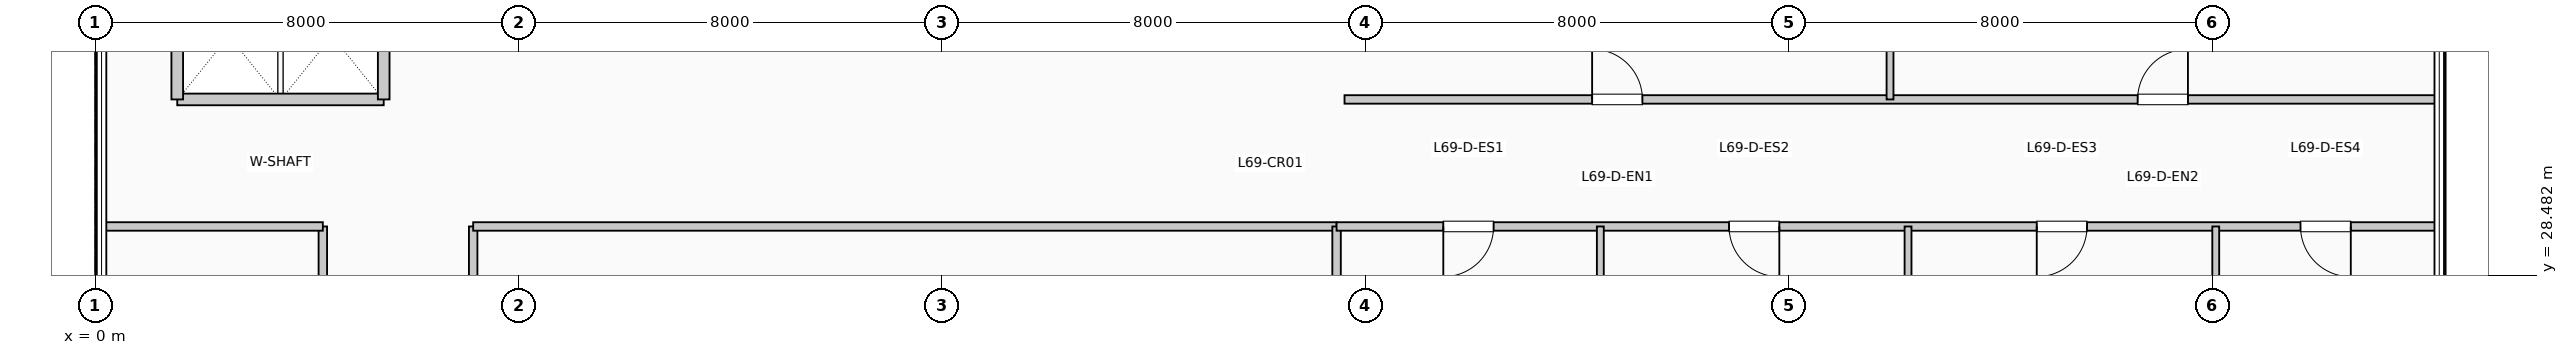
"""IFC4 building model, lengths in metres.
Left out: names, types, materials, properties, quantities, classifications, styles, units other than length and angle.
Written with IfcOpenShell. Run it as: python <this file> out.ifc"""

import sys

from ifc_helpers import new_model, si_unit, direction, frame, frame_2d, origin, place, context, subcontext, project, spatial, rectangle, extrude, element, fill, save


model = new_model("IFC4")
c1 = context("Model", 3, precision=1e-05, world=origin(), true_north=direction((0.0, 1.0)))
c2 = subcontext(c1, "Body", "Model", "MODEL_VIEW")
j1 = project(units=[si_unit("LENGTHUNIT", "METRE"), si_unit("PLANEANGLEUNIT", "RADIAN")], contexts=[c1])
p1 = place(None, origin())
s1 = spatial("IfcSite", under=j1, at=p1, CompositionType="ELEMENT")
p2 = place(p1, origin())
s2 = spatial("IfcBuilding", under=s1, at=p2, CompositionType="ELEMENT")
p3 = place(p2, frame((0.0, 0.0, 284.13)))
s3 = spatial("IfcBuildingStorey", under=s2, at=p3, CompositionType="ELEMENT", Elevation=284.13)
p4 = place(p3, frame((1.55, 31.8, 0.0), z_axis=(0.0, 0.0, 1.0), x_axis=(1.0, 0.0, 0.0)))
e1 = element("IfcWall", 1, at=p4, inside=s3, PredefinedType="PARTITIONING", context=c2, shape_type="SweptSolid", body=[
    extrude(rectangle(XDim=3.9, YDim=0.22, at=frame_2d((1.95, 0.0))), origin(), (0.0, 0.0, 1.0), 3.74),
])
for number, where, z_axis, x_axis in (
    (2, (1.55, 31.8, 0.0), (0.0, 0.0, 1.0), (0.0, 1.0, 0.0)),
    (3, (5.45, 31.8, 0.0), (0.0, 0.0, 1.0), (0.0, 1.0, 0.0)),
):
    element("IfcWall", number, at=place(p3, frame(where, z_axis=z_axis, x_axis=x_axis)), inside=s3, PredefinedType="PARTITIONING", context=c2, shape_type="SweptSolid", body=[
        extrude(rectangle(XDim=2.38, YDim=0.22, at=frame_2d((1.19, 0.0))), origin(), (0.0, 0.0, 1.0), 3.74),
    ])
p5 = place(p3, frame((4.3, 12.8, 0.0), z_axis=(0.0, 0.0, 1.0), x_axis=(0.0, 1.0, 0.0)))
e4 = element("IfcWall", 4, at=p5, inside=s3, PredefinedType="PARTITIONING", context=c2, shape_type="SweptSolid", body=[
    extrude(rectangle(XDim=16.6, YDim=0.16, at=frame_2d((8.3, 0.0))), origin(), (0.0, 0.0, 1.0), 3.74),
])
p6 = place(p5, frame((8.775, 0.0, 0.0), z_axis=(0.0, 0.0, 1.0), x_axis=(-1.0, 0.0, 0.0)))
e5 = element("IfcOpeningElement", 5, at=p6, cuts=e4, PredefinedType="OPENING", context=c2, shape_type="SweptSolid", body=[
    extrude(rectangle(XDim=0.95, YDim=2.15, at=frame_2d((0.475, 1.075))), frame((0.0, 0.09, 0.0), z_axis=(0.0, -1.0, 0.0), x_axis=(1.0, 0.0, 0.0)), (0.0, 0.0, 1.0), 0.18),
])
p7 = place(p3, frame((7.14, 12.8, 0.0), z_axis=(0.0, 0.0, 1.0), x_axis=(0.0, 1.0, 0.0)))
e6 = element("IfcWall", 6, at=p7, inside=s3, PredefinedType="PARTITIONING", context=c2, shape_type="SweptSolid", body=[
    extrude(rectangle(XDim=16.6, YDim=0.16, at=frame_2d((8.3, 0.0))), origin(), (0.0, 0.0, 1.0), 3.74),
])
p8 = place(p7, frame((1.849, 0.0, 0.0)))
e7 = element("IfcOpeningElement", 7, at=p8, cuts=e6, PredefinedType="OPENING", context=c2, shape_type="SweptSolid", body=[
    extrude(rectangle(XDim=0.95, YDim=2.15, at=frame_2d((0.475, 1.075))), frame((0.0, 0.09, 0.0), z_axis=(0.0, -1.0, 0.0), x_axis=(1.0, 0.0, 0.0)), (0.0, 0.0, 1.0), 0.18),
])
p9 = place(p7, frame((6.829, 0.0, 0.0)))
e8 = element("IfcOpeningElement", 8, at=p9, cuts=e6, PredefinedType="OPENING", context=c2, shape_type="SweptSolid", body=[
    extrude(rectangle(XDim=0.95, YDim=2.15, at=frame_2d((0.475, 1.075))), frame((0.0, 0.09, 0.0), z_axis=(0.0, -1.0, 0.0), x_axis=(1.0, 0.0, 0.0)), (0.0, 0.0, 1.0), 0.18),
])
p10 = place(p7, frame((12.805, 0.0, 0.0)))
e9 = element("IfcOpeningElement", 9, at=p10, cuts=e6, PredefinedType="OPENING", context=c2, shape_type="SweptSolid", body=[
    extrude(rectangle(XDim=0.95, YDim=2.15, at=frame_2d((0.475, 1.075))), frame((0.0, 0.09, 0.0), z_axis=(0.0, -1.0, 0.0), x_axis=(1.0, 0.0, 0.0)), (0.0, 0.0, 1.0), 0.18),
])
p11 = place(p3, frame((0.19, 29.4, 0.0), z_axis=(0.0, 0.0, 1.0), x_axis=(1.0, 0.0, 0.0)))
e10 = element("IfcWall", 10, at=p11, inside=s3, PredefinedType="PARTITIONING", context=c2, shape_type="SweptSolid", body=[
    extrude(rectangle(XDim=4.11, YDim=0.16, at=frame_2d((2.055, 0.0))), origin(), (0.0, 0.0, 1.0), 3.425),
])
p12 = place(p3, frame((7.14, 29.4, 0.0), z_axis=(0.0, 0.0, 1.0), x_axis=(1.0, 0.0, 0.0)))
e11 = element("IfcWall", 11, at=p12, inside=s3, PredefinedType="PARTITIONING", context=c2, shape_type="SweptSolid", body=[
    extrude(rectangle(XDim=16.31, YDim=0.16, at=frame_2d((8.155, 0.0))), origin(), (0.0, 0.0, 1.0), 3.425),
])
p13 = place(p3, frame((23.45, 5.99, 0.0), z_axis=(0.0, 0.0, 1.0), x_axis=(0.0, 1.0, 0.0)))
e12 = element("IfcWall", 12, at=p13, inside=s3, PredefinedType="PARTITIONING", context=c2, shape_type="SweptSolid", body=[
    extrude(rectangle(XDim=23.41, YDim=0.16, at=frame_2d((11.705, 0.0))), origin(), (0.0, 0.0, 1.0), 3.175),
])
p14 = place(p3, frame((23.45, 29.4, 0.0), z_axis=(0.0, 0.0, 1.0), x_axis=(1.0, 0.0, 0.0)))
e13 = element("IfcWall", 13, at=p14, inside=s3, PredefinedType="PARTITIONING", context=c2, shape_type="SweptSolid", body=[
    extrude(rectangle(XDim=20.76, YDim=0.16, at=frame_2d((10.38, 0.0))), origin(), (0.0, 0.0, 1.0), 3.425),
])
p15 = place(p14, frame((2.966, 0.0, 0.0), z_axis=(0.0, 0.0, 1.0), x_axis=(-1.0, 0.0, 0.0)))
e14 = element("IfcOpeningElement", 14, at=p15, cuts=e13, PredefinedType="OPENING", context=c2, shape_type="SweptSolid", body=[
    extrude(rectangle(XDim=0.95, YDim=2.15, at=frame_2d((0.475, 1.075))), frame((0.0, 0.09, 0.0), z_axis=(0.0, -1.0, 0.0), x_axis=(1.0, 0.0, 0.0)), (0.0, 0.0, 1.0), 0.18),
])
p16 = place(p14, frame((8.364, 0.0, 0.0), z_axis=(0.0, 0.0, 1.0), x_axis=(-1.0, 0.0, 0.0)))
e15 = element("IfcOpeningElement", 15, at=p16, cuts=e13, PredefinedType="OPENING", context=c2, shape_type="SweptSolid", body=[
    extrude(rectangle(XDim=0.95, YDim=2.15, at=frame_2d((0.475, 1.075))), frame((0.0, 0.09, 0.0), z_axis=(0.0, -1.0, 0.0), x_axis=(1.0, 0.0, 0.0)), (0.0, 0.0, 1.0), 0.18),
])
p17 = place(p14, frame((14.177, 0.0, 0.0), z_axis=(0.0, 0.0, 1.0), x_axis=(-1.0, 0.0, 0.0)))
e16 = element("IfcOpeningElement", 16, at=p17, cuts=e13, PredefinedType="OPENING", context=c2, shape_type="SweptSolid", body=[
    extrude(rectangle(XDim=0.95, YDim=2.15, at=frame_2d((0.475, 1.075))), frame((0.0, 0.09, 0.0), z_axis=(0.0, -1.0, 0.0), x_axis=(1.0, 0.0, 0.0)), (0.0, 0.0, 1.0), 0.18),
])
p18 = place(p14, frame((19.159, 0.0, 0.0), z_axis=(0.0, 0.0, 1.0), x_axis=(-1.0, 0.0, 0.0)))
e17 = element("IfcOpeningElement", 17, at=p18, cuts=e13, PredefinedType="OPENING", context=c2, shape_type="SweptSolid", body=[
    extrude(rectangle(XDim=0.95, YDim=2.15, at=frame_2d((0.475, 1.075))), frame((0.0, 0.09, 0.0), z_axis=(0.0, -1.0, 0.0), x_axis=(1.0, 0.0, 0.0)), (0.0, 0.0, 1.0), 0.18),
])
p19 = place(p3, frame((23.6, 31.8, 0.0), z_axis=(0.0, 0.0, 1.0), x_axis=(1.0, 0.0, 0.0)))
e18 = element("IfcWall", 18, at=p19, inside=s3, PredefinedType="PARTITIONING", context=c2, shape_type="SweptSolid", body=[
    extrude(rectangle(XDim=20.61, YDim=0.16, at=frame_2d((10.305, 0.0))), origin(), (0.0, 0.0, 1.0), 3.74),
])
p20 = place(p19, frame((4.677, 0.0, 0.0)))
e19 = element("IfcOpeningElement", 19, at=p20, cuts=e18, PredefinedType="OPENING", context=c2, shape_type="SweptSolid", body=[
    extrude(rectangle(XDim=0.95, YDim=2.15, at=frame_2d((0.475, 1.075))), frame((0.0, 0.09, 0.0), z_axis=(0.0, -1.0, 0.0), x_axis=(1.0, 0.0, 0.0)), (0.0, 0.0, 1.0), 0.18),
])
p21 = place(p19, frame((14.982, 0.0, 0.0)))
e20 = element("IfcOpeningElement", 20, at=p21, cuts=e18, PredefinedType="OPENING", context=c2, shape_type="SweptSolid", body=[
    extrude(rectangle(XDim=0.95, YDim=2.15, at=frame_2d((0.475, 1.075))), frame((0.0, 0.09, 0.0), z_axis=(0.0, -1.0, 0.0), x_axis=(1.0, 0.0, 0.0)), (0.0, 0.0, 1.0), 0.18),
])
for number, where, z_axis, x_axis in (
    (21, (28.432, 25.19, 0.0), (0.0, 0.0, 1.0), (0.0, 1.0, 0.0)),
    (22, (34.245, 25.19, 0.0), (0.0, 0.0, 1.0), (0.0, 1.0, 0.0)),
):
    element("IfcWall", number, at=place(p3, frame(where, z_axis=z_axis, x_axis=x_axis)), inside=s3, PredefinedType="PARTITIONING", context=c2, shape_type="SweptSolid", body=[
        extrude(rectangle(XDim=4.21, YDim=0.13, at=frame_2d((2.105, 0.0))), origin(), (0.0, 0.0, 1.0), 3.74),
    ])
p22 = place(p3, frame((40.058, 25.19, 0.0), z_axis=(0.0, 0.0, 1.0), x_axis=(0.0, 1.0, 0.0)))
e23 = element("IfcWall", 23, at=p22, inside=s3, PredefinedType="PARTITIONING", context=c2, shape_type="SweptSolid", body=[
    extrude(rectangle(XDim=4.21, YDim=0.13, at=frame_2d((2.105, 0.0))), origin(), (0.0, 0.0, 1.0), 3.175),
])
p23 = place(p3, frame((33.905, 31.8, 0.0), z_axis=(0.0, 0.0, 1.0), x_axis=(0.0, 1.0, 0.0)))
e24 = element("IfcWall", 24, at=p23, inside=s3, PredefinedType="PARTITIONING", context=c2, shape_type="SweptSolid", body=[
    extrude(rectangle(XDim=14.01, YDim=0.13, at=frame_2d((7.005, 0.0))), origin(), (0.0, 0.0, 1.0), 3.74),
])
p24 = place(p15, origin())
e25 = element("IfcDoor", 25, at=p24, inside=s3, OperationType="SINGLE_SWING_LEFT", PredefinedType="DOOR", context=c2, shape_type="SweptSolid", body=[
    extrude(rectangle(XDim=0.95, YDim=2.15, at=frame_2d((0.475, 1.075))), frame((0.0, 0.025, 0.0), z_axis=(0.0, -1.0, 0.0), x_axis=(1.0, 0.0, 0.0)), (0.0, 0.0, 1.0), 0.05),
])
fill(e14, e25)
p25 = place(p16, origin())
e26 = element("IfcDoor", 26, at=p25, inside=s3, OperationType="SINGLE_SWING_RIGHT", PredefinedType="DOOR", context=c2, shape_type="SweptSolid", body=[
    extrude(rectangle(XDim=0.95, YDim=2.15, at=frame_2d((0.475, 1.075))), frame((0.0, 0.025, 0.0), z_axis=(0.0, -1.0, 0.0), x_axis=(1.0, 0.0, 0.0)), (0.0, 0.0, 1.0), 0.05),
])
fill(e15, e26)
p26 = place(p17, origin())
e27 = element("IfcDoor", 27, at=p26, inside=s3, OperationType="SINGLE_SWING_LEFT", PredefinedType="DOOR", context=c2, shape_type="SweptSolid", body=[
    extrude(rectangle(XDim=0.95, YDim=2.15, at=frame_2d((0.475, 1.075))), frame((0.0, 0.025, 0.0), z_axis=(0.0, -1.0, 0.0), x_axis=(1.0, 0.0, 0.0)), (0.0, 0.0, 1.0), 0.05),
])
fill(e16, e27)
p27 = place(p18, origin())
e28 = element("IfcDoor", 28, at=p27, inside=s3, OperationType="SINGLE_SWING_RIGHT", PredefinedType="DOOR", context=c2, shape_type="SweptSolid", body=[
    extrude(rectangle(XDim=0.95, YDim=2.15, at=frame_2d((0.475, 1.075))), frame((0.0, 0.025, 0.0), z_axis=(0.0, -1.0, 0.0), x_axis=(1.0, 0.0, 0.0)), (0.0, 0.0, 1.0), 0.05),
])
fill(e17, e28)
p28 = place(p20, origin())
e29 = element("IfcDoor", 29, at=p28, inside=s3, OperationType="SINGLE_SWING_LEFT", PredefinedType="DOOR", context=c2, shape_type="SweptSolid", body=[
    extrude(rectangle(XDim=0.95, YDim=2.15, at=frame_2d((0.475, 1.075))), frame((0.0, 0.025, 0.0), z_axis=(0.0, -1.0, 0.0), x_axis=(1.0, 0.0, 0.0)), (0.0, 0.0, 1.0), 0.05),
])
fill(e19, e29)
p29 = place(p21, origin())
e30 = element("IfcDoor", 30, at=p29, inside=s3, OperationType="SINGLE_SWING_RIGHT", PredefinedType="DOOR", context=c2, shape_type="SweptSolid", body=[
    extrude(rectangle(XDim=0.95, YDim=2.15, at=frame_2d((0.475, 1.075))), frame((0.0, 0.025, 0.0), z_axis=(0.0, -1.0, 0.0), x_axis=(1.0, 0.0, 0.0)), (0.0, 0.0, 1.0), 0.05),
])
fill(e20, e30)
save(model, sys.argv[1])
